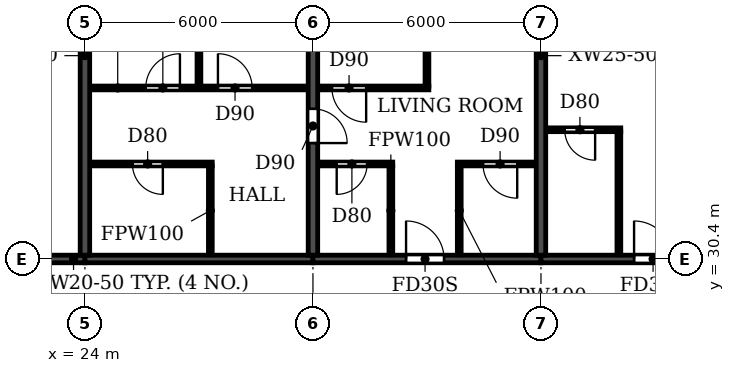
"""IFC4 building model, lengths in metres.
Left out: names, types, materials, properties, quantities, classifications, styles, units other than length and angle.
Written with IfcOpenShell. Run it as: python <this file> out.ifc"""

import sys

from ifc_helpers import new_model, si_unit, direction, frame, frame_2d, origin, place, context, subcontext, project, spatial, rectangle, extrude, element, fill, save


model = new_model("IFC4")
c1 = context("Model", 3, precision=1e-05, world=origin(), true_north=direction((0.0, 1.0)))
c2 = subcontext(c1, "Body", "Model", "MODEL_VIEW")
j1 = project(units=[si_unit("LENGTHUNIT", "METRE"), si_unit("PLANEANGLEUNIT", "RADIAN")], contexts=[c1])
p1 = place(None, origin())
s1 = spatial("IfcSite", under=j1, at=p1, CompositionType="ELEMENT")
p2 = place(p1, origin())
s2 = spatial("IfcBuilding", under=s1, at=p2, CompositionType="ELEMENT")
p3 = place(p2, frame((0.0, 0.0, 257.7)))
s3 = spatial("IfcBuildingStorey", under=s2, at=p3, CompositionType="ELEMENT", Elevation=257.7)
p4 = place(p3, frame((24.0, 30.5, 0.0), z_axis=(0.0, 0.0, 1.0), x_axis=(0.0, 1.0, 0.0)))
e1 = element("IfcWall", 1, at=p4, inside=s3, PredefinedType="SHEAR", context=c2, shape_type="SweptSolid", body=[
    extrude(rectangle(XDim=10.5, YDim=0.25, at=frame_2d((5.25, 0.0))), origin(), (0.0, 0.0, 1.0), 3.0),
])
p5 = place(p3, frame((30.0, 30.5, 0.0), z_axis=(0.0, 0.0, 1.0), x_axis=(0.0, 1.0, 0.0)))
e2 = element("IfcWall", 2, at=p5, inside=s3, PredefinedType="SHEAR", context=c2, shape_type="SweptSolid", body=[
    extrude(rectangle(XDim=10.5, YDim=0.25, at=frame_2d((5.25, 0.0))), origin(), (0.0, 0.0, 1.0), 2.1),
])
p6 = place(p5, frame((2.95, 0.0, 0.0)))
e3 = element("IfcOpeningElement", 3, at=p6, cuts=e2, PredefinedType="OPENING", context=c2, shape_type="SweptSolid", body=[
    extrude(rectangle(XDim=0.9, YDim=2.1, at=frame_2d((0.45, 1.05))), frame((0.0, 0.135, 0.0), z_axis=(0.0, -1.0, 0.0), x_axis=(1.0, 0.0, 0.0)), (0.0, 0.0, 1.0), 0.27),
])
p7 = place(p3, frame((36.0, 30.5, 0.0), z_axis=(0.0, 0.0, 1.0), x_axis=(0.0, 1.0, 0.0)))
e4 = element("IfcWall", 4, at=p7, inside=s3, PredefinedType="SHEAR", context=c2, shape_type="SweptSolid", body=[
    extrude(rectangle(XDim=10.5, YDim=0.25, at=frame_2d((5.25, 0.0))), origin(), (0.0, 0.0, 1.0), 3.0),
])
p8 = place(p3, frame((18.2, 30.4, 0.0), z_axis=(0.0, 0.0, 1.0), x_axis=(1.0, 0.0, 0.0)))
e5 = element("IfcWall", 5, at=p8, inside=s3, PredefinedType="SHEAR", context=c2, shape_type="SweptSolid", body=[
    extrude(rectangle(XDim=5.8, YDim=0.2, at=frame_2d((2.9, 0.0))), origin(), (0.0, 0.0, 1.0), 2.4),
])
p9 = place(p8, frame((2.3, 0.0, 0.0)))
e6 = element("IfcOpeningElement", 6, at=p9, cuts=e5, PredefinedType="OPENING", context=c2, shape_type="SweptSolid", body=[
    extrude(rectangle(XDim=1.0, YDim=2.1, at=frame_2d((0.5, 1.05))), frame((0.0, 0.11, 0.0), z_axis=(0.0, -1.0, 0.0), x_axis=(1.0, 0.0, 0.0)), (0.0, 0.0, 1.0), 0.22),
])
p10 = place(p3, frame((24.0, 30.4, 0.0), z_axis=(0.0, 0.0, 1.0), x_axis=(1.0, 0.0, 0.0)))
e7 = element("IfcWall", 7, at=p10, inside=s3, PredefinedType="SHEAR", context=c2, shape_type="SweptSolid", body=[
    extrude(rectangle(XDim=6.0, YDim=0.2, at=frame_2d((3.0, 0.0))), origin(), (0.0, 0.0, 1.0), 2.4),
])
p11 = place(p3, frame((30.0, 30.4, 0.0), z_axis=(0.0, 0.0, 1.0), x_axis=(1.0, 0.0, 0.0)))
e8 = element("IfcWall", 8, at=p11, inside=s3, PredefinedType="SHEAR", context=c2, shape_type="SweptSolid", body=[
    extrude(rectangle(XDim=6.0, YDim=0.2, at=frame_2d((3.0, 0.0))), origin(), (0.0, 0.0, 1.0), 2.4),
])
p12 = place(p11, frame((2.45, 0.0, 0.0)))
e9 = element("IfcOpeningElement", 9, at=p12, cuts=e8, PredefinedType="OPENING", context=c2, shape_type="SweptSolid", body=[
    extrude(rectangle(XDim=1.0, YDim=2.1, at=frame_2d((0.5, 1.05))), frame((0.0, 0.11, 0.0), z_axis=(0.0, -1.0, 0.0), x_axis=(1.0, 0.0, 0.0)), (0.0, 0.0, 1.0), 0.22),
])
p13 = place(p3, frame((36.0, 30.4, 0.0), z_axis=(0.0, 0.0, 1.0), x_axis=(1.0, 0.0, 0.0)))
e10 = element("IfcWall", 10, at=p13, inside=s3, PredefinedType="SHEAR", context=c2, shape_type="SweptSolid", body=[
    extrude(rectangle(XDim=6.0, YDim=0.2, at=frame_2d((3.0, 0.0))), origin(), (0.0, 0.0, 1.0), 2.4),
])
p14 = place(p13, frame((2.45, 0.0, 0.0)))
e11 = element("IfcOpeningElement", 11, at=p14, cuts=e10, PredefinedType="OPENING", context=c2, shape_type="SweptSolid", body=[
    extrude(rectangle(XDim=1.0, YDim=2.1, at=frame_2d((0.5, 1.05))), frame((0.0, 0.11, 0.0), z_axis=(0.0, -1.0, 0.0), x_axis=(1.0, 0.0, 0.0)), (0.0, 0.0, 1.0), 0.22),
])
p15 = place(p3, frame((24.135, 32.9, 0.0), z_axis=(0.0, 0.0, 1.0), x_axis=(1.0, 0.0, 0.0)))
e12 = element("IfcWall", 12, at=p15, inside=s3, PredefinedType="PARTITIONING", context=c2, shape_type="SweptSolid", body=[
    extrude(rectangle(XDim=3.215, YDim=0.1, at=frame_2d((1.607, 0.0))), origin(), (0.0, 0.0, 1.0), 3.0),
])
p16 = place(p15, frame((1.115, 0.0, 0.0)))
e13 = element("IfcOpeningElement", 13, at=p16, cuts=e12, PredefinedType="OPENING", context=c2, shape_type="SweptSolid", body=[
    extrude(rectangle(XDim=0.8, YDim=2.1, at=frame_2d((0.4, 1.05))), frame((0.0, 0.06, 0.0), z_axis=(0.0, -1.0, 0.0), x_axis=(1.0, 0.0, 0.0)), (0.0, 0.0, 1.0), 0.12),
])
p17 = place(p3, frame((30.135, 32.9, 0.0), z_axis=(0.0, 0.0, 1.0), x_axis=(1.0, 0.0, 0.0)))
e14 = element("IfcWall", 14, at=p17, inside=s3, PredefinedType="PARTITIONING", context=c2, shape_type="SweptSolid", body=[
    extrude(rectangle(XDim=1.965, YDim=0.1, at=frame_2d((0.982, 0.0))), origin(), (0.0, 0.0, 1.0), 3.0),
])
p18 = place(p17, frame((0.49, 0.0, 0.0)))
e15 = element("IfcOpeningElement", 15, at=p18, cuts=e14, PredefinedType="OPENING", context=c2, shape_type="SweptSolid", body=[
    extrude(rectangle(XDim=0.8, YDim=2.1, at=frame_2d((0.4, 1.05))), frame((0.0, 0.06, 0.0), z_axis=(0.0, -1.0, 0.0), x_axis=(1.0, 0.0, 0.0)), (0.0, 0.0, 1.0), 0.12),
])
p19 = place(p3, frame((33.8, 32.9, 0.0), z_axis=(0.0, 0.0, 1.0), x_axis=(1.0, 0.0, 0.0)))
e16 = element("IfcWall", 16, at=p19, inside=s3, PredefinedType="PARTITIONING", context=c2, shape_type="SweptSolid", body=[
    extrude(rectangle(XDim=2.065, YDim=0.1, at=frame_2d((1.032, 0.0))), origin(), (0.0, 0.0, 1.0), 3.0),
])
p20 = place(p19, frame((0.675, 0.0, 0.0)))
e17 = element("IfcOpeningElement", 17, at=p20, cuts=e16, PredefinedType="OPENING", context=c2, shape_type="SweptSolid", body=[
    extrude(rectangle(XDim=0.9, YDim=2.1, at=frame_2d((0.45, 1.05))), frame((0.0, 0.06, 0.0), z_axis=(0.0, -1.0, 0.0), x_axis=(1.0, 0.0, 0.0)), (0.0, 0.0, 1.0), 0.12),
])
p21 = place(p3, frame((36.135, 33.8, 0.0), z_axis=(0.0, 0.0, 1.0), x_axis=(1.0, 0.0, 0.0)))
e18 = element("IfcWall", 18, at=p21, inside=s3, PredefinedType="PARTITIONING", context=c2, shape_type="SweptSolid", body=[
    extrude(rectangle(XDim=1.965, YDim=0.1, at=frame_2d((0.982, 0.0))), origin(), (0.0, 0.0, 1.0), 3.0),
])
p22 = place(p21, frame((0.49, 0.0, 0.0)))
e19 = element("IfcOpeningElement", 19, at=p22, cuts=e18, PredefinedType="OPENING", context=c2, shape_type="SweptSolid", body=[
    extrude(rectangle(XDim=0.8, YDim=2.1, at=frame_2d((0.4, 1.05))), frame((0.0, 0.06, 0.0), z_axis=(0.0, -1.0, 0.0), x_axis=(1.0, 0.0, 0.0)), (0.0, 0.0, 1.0), 0.12),
])
p23 = place(p3, frame((24.135, 34.9, 0.0), z_axis=(0.0, 0.0, 1.0), x_axis=(1.0, 0.0, 0.0)))
e20 = element("IfcWall", 20, at=p23, inside=s3, PredefinedType="PARTITIONING", context=c2, shape_type="SweptSolid", body=[
    extrude(rectangle(XDim=5.73, YDim=0.1, at=frame_2d((2.865, 0.0))), origin(), (0.0, 0.0, 1.0), 3.0),
])
p24 = place(p23, frame((1.465, 0.0, 0.0)))
e21 = element("IfcOpeningElement", 21, at=p24, cuts=e20, PredefinedType="OPENING", context=c2, shape_type="SweptSolid", body=[
    extrude(rectangle(XDim=0.9, YDim=2.1, at=frame_2d((0.45, 1.05))), frame((0.0, 0.06, 0.0), z_axis=(0.0, -1.0, 0.0), x_axis=(1.0, 0.0, 0.0)), (0.0, 0.0, 1.0), 0.12),
])
p25 = place(p23, frame((3.365, 0.0, 0.0)))
e22 = element("IfcOpeningElement", 22, at=p25, cuts=e20, PredefinedType="OPENING", context=c2, shape_type="SweptSolid", body=[
    extrude(rectangle(XDim=0.9, YDim=2.1, at=frame_2d((0.45, 1.05))), frame((0.0, 0.06, 0.0), z_axis=(0.0, -1.0, 0.0), x_axis=(1.0, 0.0, 0.0)), (0.0, 0.0, 1.0), 0.12),
])
p26 = place(p3, frame((30.135, 34.9, 0.0), z_axis=(0.0, 0.0, 1.0), x_axis=(1.0, 0.0, 0.0)))
e23 = element("IfcWall", 23, at=p26, inside=s3, PredefinedType="PARTITIONING", context=c2, shape_type="SweptSolid", body=[
    extrude(rectangle(XDim=2.915, YDim=0.1, at=frame_2d((1.458, 0.0))), origin(), (0.0, 0.0, 1.0), 3.0),
])
p27 = place(p26, frame((0.365, 0.0, 0.0)))
e24 = element("IfcOpeningElement", 24, at=p27, cuts=e23, PredefinedType="OPENING", context=c2, shape_type="SweptSolid", body=[
    extrude(rectangle(XDim=0.9, YDim=2.1, at=frame_2d((0.45, 1.05))), frame((0.0, 0.06, 0.0), z_axis=(0.0, -1.0, 0.0), x_axis=(1.0, 0.0, 0.0)), (0.0, 0.0, 1.0), 0.12),
])
p28 = place(p3, frame((27.0, 34.95, 0.0), z_axis=(0.0, 0.0, 1.0), x_axis=(0.0, 1.0, 0.0)))
e25 = element("IfcWall", 25, at=p28, inside=s3, PredefinedType="PARTITIONING", context=c2, shape_type="SweptSolid", body=[
    extrude(rectangle(XDim=6.19, YDim=0.1, at=frame_2d((3.095, 0.0))), origin(), (0.0, 0.0, 1.0), 3.0),
])
for number, where, z_axis, x_axis in (
    (26, (27.3, 30.51, 0.0), (0.0, 0.0, 1.0), (0.0, 1.0, 0.0)),
    (27, (32.05, 30.51, 0.0), (0.0, 0.0, 1.0), (0.0, 1.0, 0.0)),
):
    element("IfcWall", number, at=place(p3, frame(where, z_axis=z_axis, x_axis=x_axis)), inside=s3, PredefinedType="PARTITIONING", context=c2, shape_type="SweptSolid", body=[
        extrude(rectangle(XDim=2.34, YDim=0.1, at=frame_2d((1.17, 0.0))), origin(), (0.0, 0.0, 1.0), 3.0),
    ])
p29 = place(p3, frame((33.0, 34.95, 0.0), z_axis=(0.0, 0.0, 1.0), x_axis=(0.0, 1.0, 0.0)))
e28 = element("IfcWall", 28, at=p29, inside=s3, PredefinedType="PARTITIONING", context=c2, shape_type="SweptSolid", body=[
    extrude(rectangle(XDim=6.19, YDim=0.1, at=frame_2d((3.095, 0.0))), origin(), (0.0, 0.0, 1.0), 3.0),
])
p30 = place(p3, frame((33.85, 30.51, 0.0), z_axis=(0.0, 0.0, 1.0), x_axis=(0.0, 1.0, 0.0)))
e29 = element("IfcWall", 29, at=p30, inside=s3, PredefinedType="PARTITIONING", context=c2, shape_type="SweptSolid", body=[
    extrude(rectangle(XDim=2.34, YDim=0.1, at=frame_2d((1.17, 0.0))), origin(), (0.0, 0.0, 1.0), 3.0),
])
p31 = place(p3, frame((38.05, 30.51, 0.0), z_axis=(0.0, 0.0, 1.0), x_axis=(0.0, 1.0, 0.0)))
e30 = element("IfcWall", 30, at=p31, inside=s3, PredefinedType="PARTITIONING", context=c2, shape_type="SweptSolid", body=[
    extrude(rectangle(XDim=3.24, YDim=0.1, at=frame_2d((1.62, 0.0))), origin(), (0.0, 0.0, 1.0), 3.0),
])
p32 = place(p16, frame((0.8, 0.0, 0.0), z_axis=(0.0, 0.0, 1.0), x_axis=(-1.0, 0.0, 0.0)))
e31 = element("IfcDoor", 31, at=p32, inside=s3, OperationType="SINGLE_SWING_LEFT", PredefinedType="DOOR", context=c2, shape_type="SweptSolid", body=[
    extrude(rectangle(XDim=0.8, YDim=2.1, at=frame_2d((0.4, 1.05))), frame((0.0, 0.025, 0.0), z_axis=(0.0, -1.0, 0.0), x_axis=(1.0, 0.0, 0.0)), (0.0, 0.0, 1.0), 0.05),
])
fill(e13, e31)
p33 = place(p24, origin())
e32 = element("IfcDoor", 32, at=p33, inside=s3, OperationType="SINGLE_SWING_RIGHT", PredefinedType="DOOR", context=c2, shape_type="SweptSolid", body=[
    extrude(rectangle(XDim=0.9, YDim=2.1, at=frame_2d((0.45, 1.05))), frame((0.0, 0.025, 0.0), z_axis=(0.0, -1.0, 0.0), x_axis=(1.0, 0.0, 0.0)), (0.0, 0.0, 1.0), 0.05),
])
fill(e21, e32)
p34 = place(p25, origin())
e33 = element("IfcDoor", 33, at=p34, inside=s3, OperationType="SINGLE_SWING_LEFT", PredefinedType="DOOR", context=c2, shape_type="SweptSolid", body=[
    extrude(rectangle(XDim=0.9, YDim=2.1, at=frame_2d((0.45, 1.05))), frame((0.0, 0.025, 0.0), z_axis=(0.0, -1.0, 0.0), x_axis=(1.0, 0.0, 0.0)), (0.0, 0.0, 1.0), 0.05),
])
fill(e22, e33)
p35 = place(p6, frame((0.9, 0.0, 0.0), z_axis=(0.0, 0.0, 1.0), x_axis=(-1.0, 0.0, 0.0)))
e34 = element("IfcDoor", 34, at=p35, inside=s3, OperationType="SINGLE_SWING_RIGHT", PredefinedType="DOOR", context=c2, shape_type="SweptSolid", body=[
    extrude(rectangle(XDim=0.9, YDim=2.1, at=frame_2d((0.45, 1.05))), frame((0.0, 0.025, 0.0), z_axis=(0.0, -1.0, 0.0), x_axis=(1.0, 0.0, 0.0)), (0.0, 0.0, 1.0), 0.05),
])
fill(e3, e34)
p36 = place(p27, frame((0.9, 0.0, 0.0), z_axis=(0.0, 0.0, 1.0), x_axis=(-1.0, 0.0, 0.0)))
e35 = element("IfcDoor", 35, at=p36, inside=s3, OperationType="SINGLE_SWING_LEFT", PredefinedType="DOOR", context=c2, shape_type="SweptSolid", body=[
    extrude(rectangle(XDim=0.9, YDim=2.1, at=frame_2d((0.45, 1.05))), frame((0.0, 0.025, 0.0), z_axis=(0.0, -1.0, 0.0), x_axis=(1.0, 0.0, 0.0)), (0.0, 0.0, 1.0), 0.05),
])
fill(e24, e35)
p37 = place(p18, frame((0.8, 0.0, 0.0), z_axis=(0.0, 0.0, 1.0), x_axis=(-1.0, 0.0, 0.0)))
e36 = element("IfcDoor", 36, at=p37, inside=s3, OperationType="SINGLE_SWING_RIGHT", PredefinedType="DOOR", context=c2, shape_type="SweptSolid", body=[
    extrude(rectangle(XDim=0.8, YDim=2.1, at=frame_2d((0.4, 1.05))), frame((0.0, 0.025, 0.0), z_axis=(0.0, -1.0, 0.0), x_axis=(1.0, 0.0, 0.0)), (0.0, 0.0, 1.0), 0.05),
])
fill(e15, e36)
p38 = place(p12, origin())
e37 = element("IfcDoor", 37, at=p38, inside=s3, OperationType="SINGLE_SWING_LEFT", PredefinedType="DOOR", context=c2, shape_type="SweptSolid", body=[
    extrude(rectangle(XDim=1.0, YDim=2.1, at=frame_2d((0.5, 1.05))), frame((0.0, 0.025, 0.0), z_axis=(0.0, -1.0, 0.0), x_axis=(1.0, 0.0, 0.0)), (0.0, 0.0, 1.0), 0.05),
])
fill(e9, e37)
p39 = place(p20, frame((0.9, 0.0, 0.0), z_axis=(0.0, 0.0, 1.0), x_axis=(-1.0, 0.0, 0.0)))
e38 = element("IfcDoor", 38, at=p39, inside=s3, OperationType="SINGLE_SWING_LEFT", PredefinedType="DOOR", context=c2, shape_type="SweptSolid", body=[
    extrude(rectangle(XDim=0.9, YDim=2.1, at=frame_2d((0.45, 1.05))), frame((0.0, 0.025, 0.0), z_axis=(0.0, -1.0, 0.0), x_axis=(1.0, 0.0, 0.0)), (0.0, 0.0, 1.0), 0.05),
])
fill(e17, e38)
p40 = place(p22, frame((0.8, 0.0, 0.0), z_axis=(0.0, 0.0, 1.0), x_axis=(-1.0, 0.0, 0.0)))
e39 = element("IfcDoor", 39, at=p40, inside=s3, OperationType="SINGLE_SWING_LEFT", PredefinedType="DOOR", context=c2, shape_type="SweptSolid", body=[
    extrude(rectangle(XDim=0.8, YDim=2.1, at=frame_2d((0.4, 1.05))), frame((0.0, 0.025, 0.0), z_axis=(0.0, -1.0, 0.0), x_axis=(1.0, 0.0, 0.0)), (0.0, 0.0, 1.0), 0.05),
])
fill(e19, e39)
p41 = place(p14, origin())
e40 = element("IfcDoor", 40, at=p41, inside=s3, OperationType="SINGLE_SWING_LEFT", PredefinedType="DOOR", context=c2, shape_type="SweptSolid", body=[
    extrude(rectangle(XDim=1.0, YDim=2.1, at=frame_2d((0.5, 1.05))), frame((0.0, 0.025, 0.0), z_axis=(0.0, -1.0, 0.0), x_axis=(1.0, 0.0, 0.0)), (0.0, 0.0, 1.0), 0.05),
])
fill(e11, e40)
save(model, sys.argv[1])
